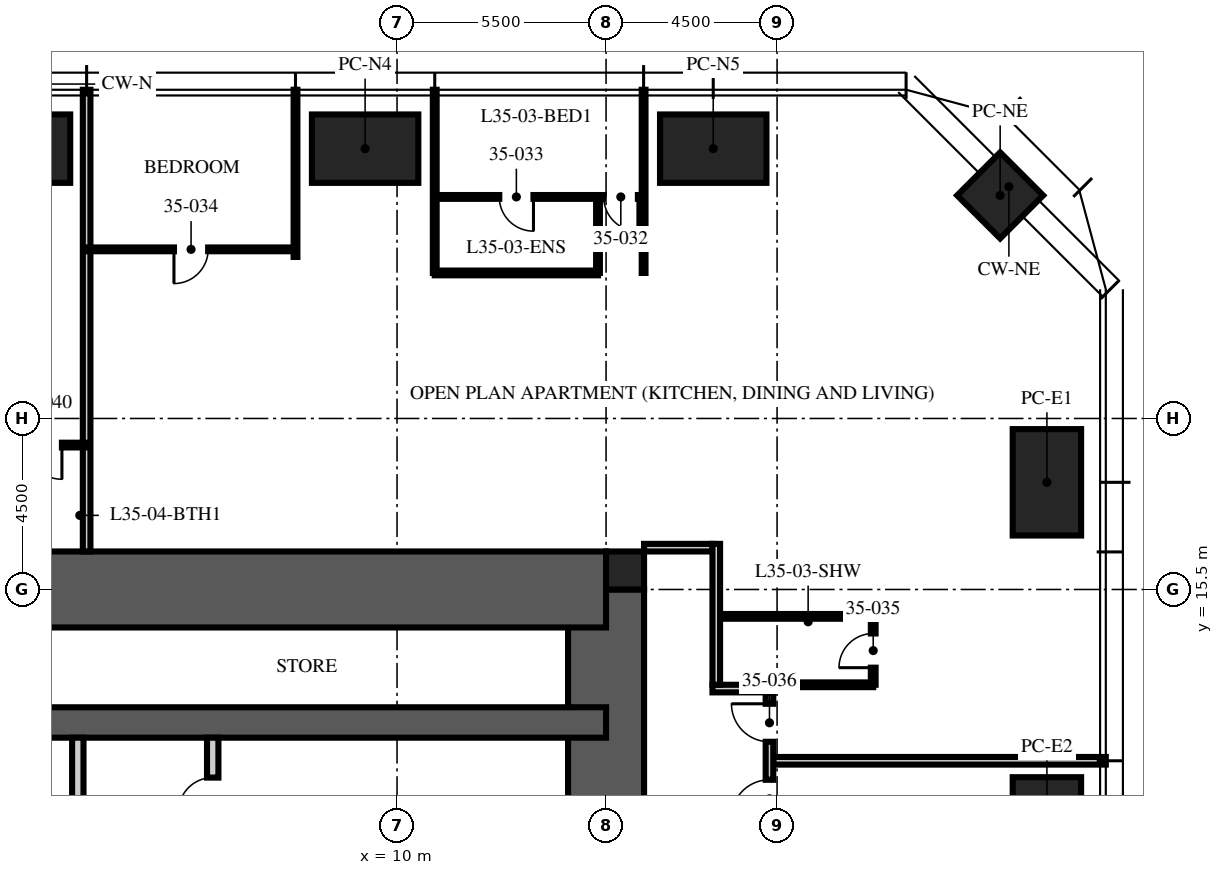
"""IFC4 building model, lengths in metres.
Left out: names, types, materials, properties, quantities, classifications, styles, units other than length and angle.
Written with IfcOpenShell. Run it as: python <this file> out.ifc"""

import sys

from ifc_helpers import new_model, si_unit, direction, frame, frame_2d, origin, origin_2d, place, context, subcontext, project, spatial, rectangle, extrude, element, fill, save


model = new_model("IFC4")
c1 = context("Model", 3, precision=1e-05, world=origin(), true_north=direction((0.0, 1.0)))
c2 = subcontext(c1, "Body", "Model", "MODEL_VIEW")
j1 = project(units=[si_unit("LENGTHUNIT", "METRE"), si_unit("PLANEANGLEUNIT", "RADIAN")], contexts=[c1])
p1 = place(None, origin())
s1 = spatial("IfcSite", under=j1, at=p1, CompositionType="ELEMENT")
p2 = place(p1, origin())
s2 = spatial("IfcBuilding", under=s1, at=p2, CompositionType="ELEMENT")
p3 = place(p2, frame((0.0, 0.0, 141.0)))
s3 = spatial("IfcBuildingStorey", under=s2, at=p3, CompositionType="ELEMENT", Elevation=141.0)
p4 = place(p3, frame((15.5, -15.5, -0.25), z_axis=(0.0, 0.0, 1.0), x_axis=(0.0, 1.0, 0.0)))
e1 = element("IfcWall", 1, at=p4, inside=s3, PredefinedType="SHEAR", context=c2, shape_type="SweptSolid", body=[
    extrude(rectangle(XDim=31.0, YDim=2.0, at=frame_2d((15.5, 0.0))), origin(), (0.0, 0.0, 1.0), 3.75),
])
p5 = place(p4, frame((6.5, 0.0, 0.25)))
e2 = element("IfcOpeningElement", 2, at=p5, cuts=e1, PredefinedType="OPENING", context=c2, shape_type="SweptSolid", body=[
    extrude(rectangle(XDim=1.2, YDim=2.1, at=frame_2d((0.6, 1.05))), frame((0.0, 1.01, 0.0), z_axis=(0.0, -1.0, 0.0), x_axis=(1.0, 0.0, 0.0)), (0.0, 0.0, 1.0), 2.02),
])
p6 = place(p4, frame((23.0, 0.0, 0.25)))
e3 = element("IfcOpeningElement", 3, at=p6, cuts=e1, PredefinedType="OPENING", context=c2, shape_type="SweptSolid", body=[
    extrude(rectangle(XDim=1.8, YDim=2.1, at=frame_2d((0.9, 1.05))), frame((0.0, 1.01, 0.0), z_axis=(0.0, -1.0, 0.0), x_axis=(1.0, 0.0, 0.0)), (0.0, 0.0, 1.0), 2.02),
])
p7 = place(p3, frame((-15.5, 15.5, -0.25), z_axis=(0.0, 0.0, 1.0), x_axis=(1.0, 0.0, 0.0)))
e4 = element("IfcWall", 4, at=p7, inside=s3, PredefinedType="SHEAR", context=c2, shape_type="SweptSolid", body=[
    extrude(rectangle(XDim=31.0, YDim=2.0, at=frame_2d((15.5, 0.0))), origin(), (0.0, 0.0, 1.0), 3.75),
])
p8 = place(p7, frame((5.0, 0.0, 0.25)))
e5 = element("IfcOpeningElement", 5, at=p8, cuts=e4, PredefinedType="OPENING", context=c2, shape_type="SweptSolid", body=[
    extrude(rectangle(XDim=1.0, YDim=2.1, at=frame_2d((0.5, 1.05))), frame((0.0, 1.01, 0.0), z_axis=(0.0, -1.0, 0.0), x_axis=(1.0, 0.0, 0.0)), (0.0, 0.0, 1.0), 2.02),
])
p9 = place(p3, frame((-15.5, 12.0, -0.25), z_axis=(0.0, 0.0, 1.0), x_axis=(1.0, 0.0, 0.0)))
e6 = element("IfcWall", 6, at=p9, inside=s3, PredefinedType="SHEAR", context=c2, shape_type="SweptSolid", body=[
    extrude(rectangle(XDim=31.0, YDim=0.8, at=frame_2d((15.5, 0.0))), origin(), (0.0, 0.0, 1.0), 3.75),
])
p10 = place(p3, frame((16.0, 16.0, -0.25), z_axis=(0.0, 0.0, 1.0), x_axis=(1.0, 0.0, 0.0)))
e7 = element("IfcColumn", 7, at=p10, inside=s3, PredefinedType="COLUMN", context=c2, shape_type="SweptSolid", body=[
    extrude(rectangle(XDim=1.0, YDim=1.0, at=origin_2d()), origin(), (0.0, 0.0, 1.0), 3.75),
])
for number, where, z_axis, x_axis in (
    (8, (0.0, 27.1, 0.0), (0.0, 0.0, 1.0), (1.0, 0.0, 0.0)),
    (9, (9.16, 27.1, 0.0), (0.0, 0.0, 1.0), (1.0, 0.0, 0.0)),
    (10, (18.32, 27.1, 0.0), (0.0, 0.0, 1.0), (1.0, 0.0, 0.0)),
    (11, (27.1, 18.32, 0.0), (0.0, 0.0, 1.0), (0.0, 1.0, 0.0)),
    (12, (27.1, 9.16, 0.0), (0.0, 0.0, 1.0), (0.0, 1.0, 0.0)),
):
    element("IfcColumn", number, at=place(p3, frame(where, z_axis=z_axis, x_axis=x_axis)), inside=s3, PredefinedType="COLUMN", context=c2, shape_type="SweptSolid", body=[
        extrude(rectangle(XDim=2.8, YDim=1.8, at=origin_2d()), origin(), (0.0, 0.0, 1.0), 3.75),
    ])
p11 = place(p3, frame((25.87, 25.87, 0.0), z_axis=(0.0, 0.0, 1.0), x_axis=(0.707106781187, -0.707106781187, 0.0)))
e13 = element("IfcColumn", 13, at=p11, inside=s3, PredefinedType="COLUMN", context=c2, shape_type="SweptSolid", body=[
    extrude(rectangle(XDim=1.6, YDim=1.6, at=origin_2d()), origin(), (0.0, 0.0, 1.0), 3.75),
])
p12 = place(p3, frame((5.15, 5.3, 0.0), z_axis=(0.0, 0.0, 1.0), x_axis=(0.0, 1.0, 0.0)))
e14 = element("IfcWall", 14, at=p12, inside=s3, PredefinedType="PARTITIONING", context=c2, shape_type="SweptSolid", body=[
    extrude(rectangle(XDim=6.3, YDim=0.3, at=frame_2d((3.15, 0.0))), origin(), (0.0, 0.0, 1.0), 3.5),
])
p13 = place(p12, frame((4.35, 0.0, 0.0)))
e15 = element("IfcOpeningElement", 15, at=p13, cuts=e14, PredefinedType="OPENING", context=c2, shape_type="SweptSolid", body=[
    extrude(rectangle(XDim=0.9, YDim=2.1, at=frame_2d((0.45, 1.05))), frame((0.0, 0.16, 0.0), z_axis=(0.0, -1.0, 0.0), x_axis=(1.0, 0.0, 0.0)), (0.0, 0.0, 1.0), 0.32),
])
p14 = place(p3, frame((1.6, 8.5, 0.0), z_axis=(0.0, 0.0, 1.0), x_axis=(0.0, 1.0, 0.0)))
e16 = element("IfcWall", 16, at=p14, inside=s3, PredefinedType="PARTITIONING", context=c2, shape_type="SweptSolid", body=[
    extrude(rectangle(XDim=3.1, YDim=0.3, at=frame_2d((1.55, 0.0))), origin(), (0.0, 0.0, 1.0), 3.5),
])
p15 = place(p3, frame((16.5, 16.6, 0.0), z_axis=(0.0, 0.0, 1.0), x_axis=(1.0, 0.0, 0.0)))
e17 = element("IfcWall", 17, at=p15, inside=s3, PredefinedType="PARTITIONING", context=c2, shape_type="SweptSolid", body=[
    extrude(rectangle(XDim=1.8, YDim=0.2, at=frame_2d((0.9, 0.0))), origin(), (0.0, 0.0, 1.0), 2.3),
])
p16 = place(p3, frame((19.9, 10.992, 0.0), z_axis=(0.0, 0.0, 1.0), x_axis=(1.0, 0.0, 0.0)))
e18 = element("IfcWall", 18, at=p16, inside=s3, PredefinedType="PARTITIONING", context=c2, shape_type="SweptSolid", body=[
    extrude(rectangle(XDim=8.75, YDim=0.2, at=frame_2d((4.375, 0.0))), origin(), (0.0, 0.0, 1.0), 2.81),
])
for number, where, z_axis, x_axis in (
    (19, (16.488, 23.83, 0.0), (0.0, 0.0, 1.0), (0.0, 1.0, 0.0)),
    (20, (10.992, 23.83, 0.0), (0.0, 0.0, 1.0), (0.0, 1.0, 0.0)),
):
    element("IfcWall", number, at=place(p3, frame(where, z_axis=z_axis, x_axis=x_axis)), inside=s3, PredefinedType="PARTITIONING", context=c2, shape_type="SweptSolid", body=[
        extrude(rectangle(XDim=4.82, YDim=0.1, at=frame_2d((2.41, 0.0))), origin(), (0.0, 0.0, 1.0), 2.81),
    ])
p17 = place(p3, frame((7.328, 24.25, 0.0), z_axis=(0.0, 0.0, 1.0), x_axis=(0.0, 1.0, 0.0)))
e21 = element("IfcWall", 21, at=p17, inside=s3, PredefinedType="PARTITIONING", context=c2, shape_type="SweptSolid", body=[
    extrude(rectangle(XDim=4.4, YDim=0.1, at=frame_2d((2.2, 0.0))), origin(), (0.0, 0.0, 1.0), 2.81),
])
p18 = place(p3, frame((1.832, 16.5, 0.0), z_axis=(0.0, 0.0, 1.0), x_axis=(0.0, 1.0, 0.0)))
e22 = element("IfcWall", 22, at=p18, inside=s3, PredefinedType="PARTITIONING", context=c2, shape_type="SweptSolid", body=[
    extrude(rectangle(XDim=12.15, YDim=0.2, at=frame_2d((6.075, 0.0))), origin(), (0.0, 0.0, 1.0), 2.81),
])
p19 = place(p3, frame((16.488, 25.83, 0.0), z_axis=(0.0, 0.0, 1.0), x_axis=(-1.0, 0.0, 0.0)))
e23 = element("IfcWall", 23, at=p19, inside=s3, PredefinedType="PARTITIONING", context=c2, shape_type="SweptSolid", body=[
    extrude(rectangle(XDim=5.496, YDim=0.1, at=frame_2d((2.748, 0.0))), origin(), (0.0, 0.0, 1.0), 2.81),
])
p20 = place(p19, frame((0.15, 0.0, 0.0)))
e24 = element("IfcOpeningElement", 24, at=p20, cuts=e23, PredefinedType="OPENING", context=c2, shape_type="SweptSolid", body=[
    extrude(rectangle(XDim=0.9, YDim=2.1, at=frame_2d((0.45, 1.05))), frame((0.0, 0.06, 0.0), z_axis=(0.0, -1.0, 0.0), x_axis=(1.0, 0.0, 0.0)), (0.0, 0.0, 1.0), 0.12),
])
p21 = place(p19, frame((2.898, 0.0, 0.0)))
e25 = element("IfcOpeningElement", 25, at=p21, cuts=e23, PredefinedType="OPENING", context=c2, shape_type="SweptSolid", body=[
    extrude(rectangle(XDim=0.9, YDim=2.1, at=frame_2d((0.45, 1.05))), frame((0.0, 0.06, 0.0), z_axis=(0.0, -1.0, 0.0), x_axis=(1.0, 0.0, 0.0)), (0.0, 0.0, 1.0), 0.12),
])
p22 = place(p3, frame((15.288, 23.83, 0.0), z_axis=(0.0, 0.0, 1.0), x_axis=(0.0, 1.0, 0.0)))
e26 = element("IfcWall", 26, at=p22, inside=s3, PredefinedType="PARTITIONING", context=c2, shape_type="SweptSolid", body=[
    extrude(rectangle(XDim=2.0, YDim=0.1, at=frame_2d((1.0, 0.0))), origin(), (0.0, 0.0, 1.0), 3.5),
])
p23 = place(p3, frame((15.288, 23.83, 0.0), z_axis=(0.0, 0.0, 1.0), x_axis=(-1.0, 0.0, 0.0)))
e27 = element("IfcWall", 27, at=p23, inside=s3, PredefinedType="PARTITIONING", context=c2, shape_type="SweptSolid", body=[
    extrude(rectangle(XDim=4.296, YDim=0.125, at=frame_2d((2.148, 0.0))), origin(), (0.0, 0.0, 1.0), 2.81),
])
p24 = place(p3, frame((7.328, 24.45, 0.0), z_axis=(0.0, 0.0, 1.0), x_axis=(-1.0, 0.0, 0.0)))
e28 = element("IfcWall", 28, at=p24, inside=s3, PredefinedType="PARTITIONING", context=c2, shape_type="SweptSolid", body=[
    extrude(rectangle(XDim=5.496, YDim=0.1, at=frame_2d((2.748, 0.0))), origin(), (0.0, 0.0, 1.0), 2.81),
])
p25 = place(p24, frame((2.298, 0.0, 0.0)))
e29 = element("IfcOpeningElement", 29, at=p25, cuts=e28, PredefinedType="OPENING", context=c2, shape_type="SweptSolid", body=[
    extrude(rectangle(XDim=0.9, YDim=2.1, at=frame_2d((0.45, 1.05))), frame((0.0, 0.06, 0.0), z_axis=(0.0, -1.0, 0.0), x_axis=(1.0, 0.0, 0.0)), (0.0, 0.0, 1.0), 0.12),
])
p26 = place(p3, frame((22.53, 12.992, 0.0), z_axis=(0.0, 0.0, 1.0), x_axis=(0.0, 1.0, 0.0)))
e30 = element("IfcWall", 30, at=p26, inside=s3, PredefinedType="PARTITIONING", context=c2, shape_type="SweptSolid", body=[
    extrude(rectangle(XDim=1.8, YDim=0.125, at=frame_2d((0.9, 0.0))), origin(), (0.0, 0.0, 1.0), 2.81),
])
p27 = place(p26, frame((0.45, 0.0, 0.0)))
e31 = element("IfcOpeningElement", 31, at=p27, cuts=e30, PredefinedType="OPENING", context=c2, shape_type="SweptSolid", body=[
    extrude(rectangle(XDim=0.9, YDim=2.1, at=frame_2d((0.45, 1.05))), frame((0.0, 0.073, 0.0), z_axis=(0.0, -1.0, 0.0), x_axis=(1.0, 0.0, 0.0)), (0.0, 0.0, 1.0), 0.145),
])
p28 = place(p3, frame((19.97, 12.992, 0.0), z_axis=(0.0, 0.0, 1.0), x_axis=(1.0, 0.0, 0.0)))
e32 = element("IfcWall", 32, at=p28, inside=s3, PredefinedType="PARTITIONING", context=c2, shape_type="SweptSolid", body=[
    extrude(rectangle(XDim=2.56, YDim=0.125, at=frame_2d((1.28, 0.0))), origin(), (0.0, 0.0, 1.0), 3.5),
])
p29 = place(p3, frame((18.5, 14.792, 0.0), z_axis=(0.0, 0.0, 1.0), x_axis=(1.0, 0.0, 0.0)))
e33 = element("IfcWall", 33, at=p29, inside=s3, PredefinedType="PARTITIONING", context=c2, shape_type="SweptSolid", body=[
    extrude(rectangle(XDim=4.03, YDim=0.125, at=frame_2d((2.015, 0.0))), origin(), (0.0, 0.0, 1.0), 3.5),
])
p30 = place(p3, frame((1.832, 19.3, 0.0), z_axis=(0.0, 0.0, 1.0), x_axis=(-1.0, 0.0, 0.0)))
e34 = element("IfcWall", 34, at=p30, inside=s3, PredefinedType="PARTITIONING", context=c2, shape_type="SweptSolid", body=[
    extrude(rectangle(XDim=2.2, YDim=0.125, at=frame_2d((1.1, 0.0))), origin(), (0.0, 0.0, 1.0), 2.7),
])
p31 = place(p30, frame((0.65, 0.0, 0.0)))
e35 = element("IfcOpeningElement", 35, at=p31, cuts=e34, PredefinedType="OPENING", context=c2, shape_type="SweptSolid", body=[
    extrude(rectangle(XDim=0.9, YDim=2.1, at=frame_2d((0.45, 1.05))), frame((0.0, 0.073, 0.0), z_axis=(0.0, -1.0, 0.0), x_axis=(1.0, 0.0, 0.0)), (0.0, 0.0, 1.0), 0.145),
])
p32 = place(p3, frame((18.3, 12.892, 0.0), z_axis=(0.0, 0.0, 1.0), x_axis=(1.0, 0.0, 0.0)))
e36 = element("IfcWall", 36, at=p32, inside=s3, PredefinedType="PARTITIONING", context=c2, shape_type="SweptSolid", body=[
    extrude(rectangle(XDim=1.6, YDim=0.2, at=frame_2d((0.8, 0.0))), origin(), (0.0, 0.0, 1.0), 3.5),
])
p33 = place(p3, frame((19.8, 9.192, 0.0), z_axis=(0.0, 0.0, 1.0), x_axis=(0.0, 1.0, 0.0)))
e37 = element("IfcWall", 37, at=p33, inside=s3, PredefinedType="PARTITIONING", context=c2, shape_type="SweptSolid", body=[
    extrude(rectangle(XDim=3.6, YDim=0.2, at=frame_2d((1.8, 0.0))), origin(), (0.0, 0.0, 1.0), 2.7),
])
p34 = place(p33, frame((0.3, 0.0, 0.0)))
e38 = element("IfcOpeningElement", 38, at=p34, cuts=e37, PredefinedType="OPENING", context=c2, shape_type="SweptSolid", body=[
    extrude(rectangle(XDim=1.0, YDim=2.2, at=frame_2d((0.5, 1.1))), frame((0.0, 0.11, 0.0), z_axis=(0.0, -1.0, 0.0), x_axis=(1.0, 0.0, 0.0)), (0.0, 0.0, 1.0), 0.22),
])
p35 = place(p33, frame((2.3, 0.0, 0.0)))
e39 = element("IfcOpeningElement", 39, at=p35, cuts=e37, PredefinedType="OPENING", context=c2, shape_type="SweptSolid", body=[
    extrude(rectangle(XDim=1.0, YDim=2.2, at=frame_2d((0.5, 1.1))), frame((0.0, 0.11, 0.0), z_axis=(0.0, -1.0, 0.0), x_axis=(1.0, 0.0, 0.0)), (0.0, 0.0, 1.0), 0.22),
])
p36 = place(p3, frame((18.4, 12.992, 0.0), z_axis=(0.0, 0.0, 1.0), x_axis=(0.0, 1.0, 0.0)))
e40 = element("IfcWall", 40, at=p36, inside=s3, PredefinedType="PARTITIONING", context=c2, shape_type="SweptSolid", body=[
    extrude(rectangle(XDim=3.708, YDim=0.2, at=frame_2d((1.854, 0.0))), origin(), (0.0, 0.0, 1.0), 2.81),
])
p37 = place(p13, origin())
e41 = element("IfcDoor", 41, at=p37, inside=s3, OperationType="SINGLE_SWING_LEFT", PredefinedType="DOOR", context=c2, shape_type="SweptSolid", body=[
    extrude(rectangle(XDim=0.9, YDim=2.1, at=frame_2d((0.45, 1.05))), frame((0.0, 0.025, 0.0), z_axis=(0.0, -1.0, 0.0), x_axis=(1.0, 0.0, 0.0)), (0.0, 0.0, 1.0), 0.05),
])
fill(e15, e41)
p38 = place(p34, origin())
e42 = element("IfcDoor", 42, at=p38, inside=s3, OperationType="SINGLE_SWING_LEFT", PredefinedType="DOOR", context=c2, shape_type="SweptSolid", body=[
    extrude(rectangle(XDim=1.0, YDim=2.2, at=frame_2d((0.5, 1.1))), frame((0.0, 0.025, 0.0), z_axis=(0.0, -1.0, 0.0), x_axis=(1.0, 0.0, 0.0)), (0.0, 0.0, 1.0), 0.05),
])
fill(e38, e42)
p39 = place(p20, origin())
e43 = element("IfcDoor", 43, at=p39, inside=s3, OperationType="SINGLE_SWING_LEFT", PredefinedType="DOOR", context=c2, shape_type="SweptSolid", body=[
    extrude(rectangle(XDim=0.9, YDim=2.1, at=frame_2d((0.45, 1.05))), frame((0.0, 0.025, 0.0), z_axis=(0.0, -1.0, 0.0), x_axis=(1.0, 0.0, 0.0)), (0.0, 0.0, 1.0), 0.05),
])
fill(e24, e43)
p40 = place(p21, origin())
e44 = element("IfcDoor", 44, at=p40, inside=s3, OperationType="SINGLE_SWING_LEFT", PredefinedType="DOOR", context=c2, shape_type="SweptSolid", body=[
    extrude(rectangle(XDim=0.9, YDim=2.1, at=frame_2d((0.45, 1.05))), frame((0.0, 0.025, 0.0), z_axis=(0.0, -1.0, 0.0), x_axis=(1.0, 0.0, 0.0)), (0.0, 0.0, 1.0), 0.05),
])
fill(e25, e44)
p41 = place(p25, origin())
e45 = element("IfcDoor", 45, at=p41, inside=s3, OperationType="SINGLE_SWING_RIGHT", PredefinedType="DOOR", context=c2, shape_type="SweptSolid", body=[
    extrude(rectangle(XDim=0.9, YDim=2.1, at=frame_2d((0.45, 1.05))), frame((0.0, 0.025, 0.0), z_axis=(0.0, -1.0, 0.0), x_axis=(1.0, 0.0, 0.0)), (0.0, 0.0, 1.0), 0.05),
])
fill(e29, e45)
p42 = place(p27, origin())
e46 = element("IfcDoor", 46, at=p42, inside=s3, OperationType="SINGLE_SWING_LEFT", PredefinedType="DOOR", context=c2, shape_type="SweptSolid", body=[
    extrude(rectangle(XDim=0.9, YDim=2.1, at=frame_2d((0.45, 1.05))), frame((0.0, 0.025, 0.0), z_axis=(0.0, -1.0, 0.0), x_axis=(1.0, 0.0, 0.0)), (0.0, 0.0, 1.0), 0.05),
])
fill(e31, e46)
p43 = place(p35, origin())
e47 = element("IfcDoor", 47, at=p43, inside=s3, OperationType="SINGLE_SWING_RIGHT", PredefinedType="DOOR", context=c2, shape_type="SweptSolid", body=[
    extrude(rectangle(XDim=1.0, YDim=2.2, at=frame_2d((0.5, 1.1))), frame((0.0, 0.025, 0.0), z_axis=(0.0, -1.0, 0.0), x_axis=(1.0, 0.0, 0.0)), (0.0, 0.0, 1.0), 0.05),
])
fill(e39, e47)
p44 = place(p31, origin())
e48 = element("IfcDoor", 48, at=p44, inside=s3, OperationType="SINGLE_SWING_LEFT", PredefinedType="DOOR", context=c2, shape_type="SweptSolid", body=[
    extrude(rectangle(XDim=0.9, YDim=2.1, at=frame_2d((0.45, 1.05))), frame((0.0, 0.025, 0.0), z_axis=(0.0, -1.0, 0.0), x_axis=(1.0, 0.0, 0.0)), (0.0, 0.0, 1.0), 0.05),
])
fill(e35, e48)
save(model, sys.argv[1])
